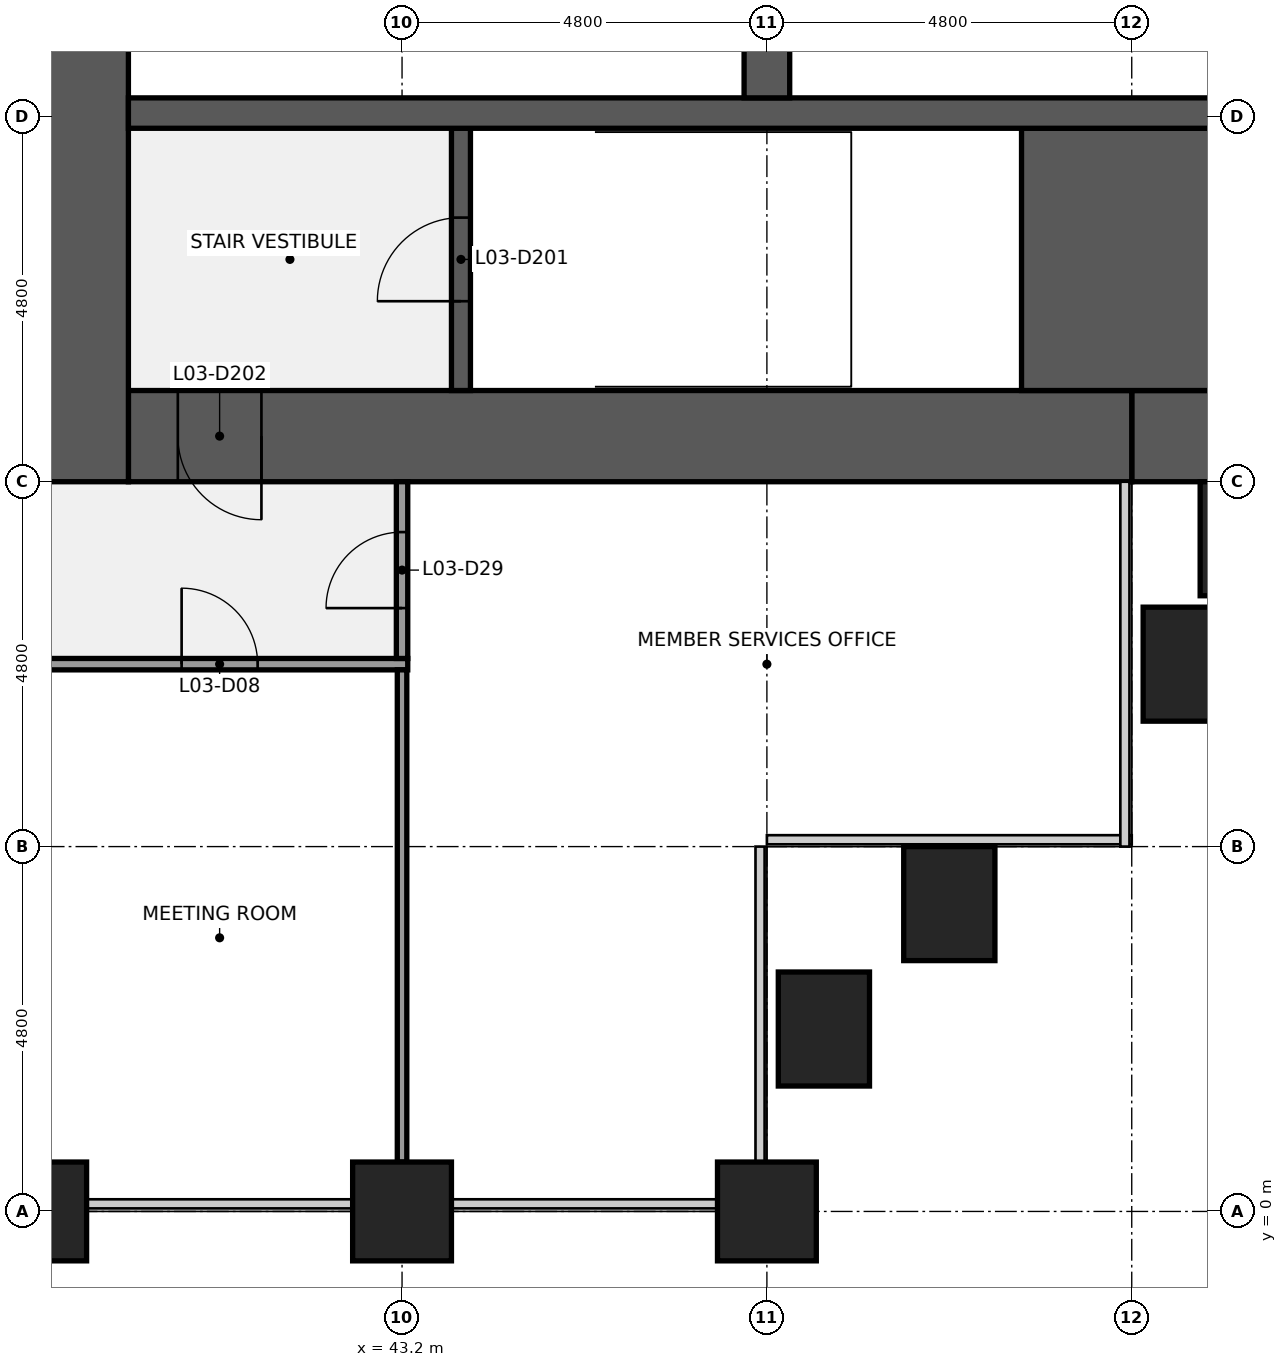
"""IFC4 building model, lengths in metres.
Left out: names, types, materials, properties, quantities, classifications, styles, units other than length and angle.
Written with IfcOpenShell. Run it as: python <this file> out.ifc"""

import sys

from ifc_helpers import new_model, si_unit, direction, frame, frame_2d, origin, origin_2d, place, context, subcontext, project, spatial, rectangle, extrude, element, fill, save


model = new_model("IFC4")
c1 = context("Model", 3, precision=1e-05, world=origin(), true_north=direction((0.0, 1.0)))
c2 = subcontext(c1, "Body", "Model", "MODEL_VIEW")
j1 = project(units=[si_unit("LENGTHUNIT", "METRE"), si_unit("PLANEANGLEUNIT", "RADIAN")], contexts=[c1])
p1 = place(None, origin())
s1 = spatial("IfcSite", under=j1, at=p1, CompositionType="ELEMENT")
p2 = place(p1, origin())
s2 = spatial("IfcBuilding", under=s1, at=p2, CompositionType="ELEMENT")
p3 = place(p2, frame((0.0, 0.0, 21.4)))
s3 = spatial("IfcBuildingStorey", under=s2, at=p3, CompositionType="ELEMENT", Elevation=21.4)
for number, where, z_axis, x_axis in (
    (1, (38.4, 0.0, 0.0), (0.0, 0.0, 1.0), (1.0, 0.0, 0.0)),
    (2, (43.2, 0.0, 0.0), (0.0, 0.0, 1.0), (1.0, 0.0, 0.0)),
    (3, (48.0, 0.0, 0.0), (0.0, 0.0, 1.0), (1.0, 0.0, 0.0)),
):
    element("IfcColumn", number, at=place(p3, frame(where, z_axis=z_axis, x_axis=x_axis)), inside=s3, PredefinedType="COLUMN", context=c2, shape_type="SweptSolid", body=[
        extrude(rectangle(XDim=1.3, YDim=1.3, at=origin_2d()), origin(), (0.0, 0.0, 1.0), 4.4),
    ])
p4 = place(p3, frame((56.4, 10.2, 0.0), z_axis=(0.0, 0.0, 1.0), x_axis=(-1.0, 0.0, 0.0)))
e4 = element("IfcWall", 4, at=p4, inside=s3, PredefinedType="SHEAR", context=c2, shape_type="SweptSolid", body=[
    extrude(rectangle(XDim=3.6, YDim=1.2, at=frame_2d((1.8, 0.0))), origin(), (0.0, 0.0, 1.0), 4.24),
])
p5 = place(p3, frame((52.8, 10.2, 0.0), z_axis=(0.0, 0.0, 1.0), x_axis=(-1.0, 0.0, 0.0)))
e5 = element("IfcWall", 5, at=p5, inside=s3, PredefinedType="SHEAR", context=c2, shape_type="SweptSolid", body=[
    extrude(rectangle(XDim=13.2, YDim=1.2, at=frame_2d((6.6, 0.0))), origin(), (0.0, 0.0, 1.0), 4.24),
])
p6 = place(p5, frame((11.45, 0.0, 0.0)))
e6 = element("IfcOpeningElement", 6, at=p6, cuts=e5, PredefinedType="OPENING", context=c2, shape_type="SweptSolid", body=[
    extrude(rectangle(XDim=1.1, YDim=2.1, at=frame_2d((0.55, 1.05))), frame((0.0, 0.61, 0.0), z_axis=(0.0, -1.0, 0.0), x_axis=(1.0, 0.0, 0.0)), (0.0, 0.0, 1.0), 1.22),
])
p7 = place(p3, frame((39.0, 9.6, 0.0), z_axis=(0.0, 0.0, 1.0), x_axis=(0.0, 1.0, 0.0)))
e7 = element("IfcWall", 7, at=p7, inside=s3, PredefinedType="SHEAR", context=c2, shape_type="SweptSolid", body=[
    extrude(rectangle(XDim=28.8, YDim=1.2, at=frame_2d((14.4, 0.0))), origin(), (0.0, 0.0, 1.0), 4.24),
])
p8 = place(p7, frame((8.7, 0.0, 0.0)))
e8 = element("IfcOpeningElement", 8, at=p8, cuts=e7, PredefinedType="OPENING", context=c2, shape_type="SweptSolid", body=[
    extrude(rectangle(XDim=1.8, YDim=2.1, at=frame_2d((0.9, 1.05))), frame((0.0, 0.61, 0.0), z_axis=(0.0, -1.0, 0.0), x_axis=(1.0, 0.0, 0.0)), (0.0, 0.0, 1.0), 1.22),
])
p9 = place(p7, frame((18.3, 0.0, 0.0)))
e9 = element("IfcOpeningElement", 9, at=p9, cuts=e7, PredefinedType="OPENING", context=c2, shape_type="SweptSolid", body=[
    extrude(rectangle(XDim=1.8, YDim=2.1, at=frame_2d((0.9, 1.05))), frame((0.0, 0.61, 0.0), z_axis=(0.0, -1.0, 0.0), x_axis=(1.0, 0.0, 0.0)), (0.0, 0.0, 1.0), 1.22),
])
p10 = place(p3, frame((51.35, 12.525, 0.0), z_axis=(0.0, 0.0, 1.0), x_axis=(1.0, 0.0, 0.0)))
e10 = element("IfcWall", 10, at=p10, inside=s3, PredefinedType="SHEAR", context=c2, shape_type="SweptSolid", body=[
    extrude(rectangle(XDim=5.05, YDim=3.45, at=frame_2d((2.525, 0.0))), origin(), (0.0, 0.0, 1.0), 4.24),
])
p11 = place(p3, frame((43.975, 10.8, 0.0), z_axis=(0.0, 0.0, 1.0), x_axis=(0.0, 1.0, 0.0)))
e11 = element("IfcWall", 11, at=p11, inside=s3, PredefinedType="SHEAR", context=c2, shape_type="SweptSolid", body=[
    extrude(rectangle(XDim=3.45, YDim=0.25, at=frame_2d((1.725, 0.0))), origin(), (0.0, 0.0, 1.0), 4.24),
])
p12 = place(p11, frame((1.175, 0.0, 0.0)))
e12 = element("IfcOpeningElement", 12, at=p12, cuts=e11, PredefinedType="OPENING", context=c2, shape_type="SweptSolid", body=[
    extrude(rectangle(XDim=1.1, YDim=2.1, at=frame_2d((0.55, 1.05))), frame((0.0, 0.135, 0.0), z_axis=(0.0, -1.0, 0.0), x_axis=(1.0, 0.0, 0.0)), (0.0, 0.0, 1.0), 0.27),
])
p13 = place(p3, frame((39.6, 14.45, 0.0), z_axis=(0.0, 0.0, 1.0), x_axis=(1.0, 0.0, 0.0)))
e13 = element("IfcWall", 13, at=p13, inside=s3, PredefinedType="SHEAR", context=c2, shape_type="SweptSolid", body=[
    extrude(rectangle(XDim=16.8, YDim=0.4, at=frame_2d((8.4, 0.0))), origin(), (0.0, 0.0, 1.0), 4.24),
])
p14 = place(p3, frame((48.0, 14.65, 0.0), z_axis=(0.0, 0.0, 1.0), x_axis=(0.0, 1.0, 0.0)))
e14 = element("IfcWall", 14, at=p14, inside=s3, PredefinedType="SHEAR", context=c2, shape_type="SweptSolid", body=[
    extrude(rectangle(XDim=2.6, YDim=0.6, at=frame_2d((1.3, 0.0))), origin(), (0.0, 0.0, 1.0), 4.24),
])
p15 = place(p3, frame((38.325, 7.2, 0.0), z_axis=(0.0, 0.0, 1.0), x_axis=(1.0, 0.0, 0.0)))
e15 = element("IfcWall", 15, at=p15, inside=s3, PredefinedType="PARTITIONING", context=c2, shape_type="SweptSolid", body=[
    extrude(rectangle(XDim=4.95, YDim=0.15, at=frame_2d((2.475, 0.0))), origin(), (0.0, 0.0, 1.0), 3.27),
])
p16 = place(p15, frame((1.975, 0.0, 0.0)))
e16 = element("IfcOpeningElement", 16, at=p16, cuts=e15, PredefinedType="OPENING", context=c2, shape_type="SweptSolid", body=[
    extrude(rectangle(XDim=1.0, YDim=2.1, at=frame_2d((0.5, 1.05))), frame((0.0, 0.085, 0.0), z_axis=(0.0, -1.0, 0.0), x_axis=(1.0, 0.0, 0.0)), (0.0, 0.0, 1.0), 0.17),
])
p17 = place(p3, frame((43.2, 0.65, 0.0), z_axis=(0.0, 0.0, 1.0), x_axis=(0.0, 1.0, 0.0)))
e17 = element("IfcWall", 17, at=p17, inside=s3, PredefinedType="PARTITIONING", context=c2, shape_type="SweptSolid", body=[
    extrude(rectangle(XDim=6.475, YDim=0.125, at=frame_2d((3.238, 0.0))), origin(), (0.0, 0.0, 1.0), 3.27),
])
p18 = place(p3, frame((43.2, 7.275, 0.0), z_axis=(0.0, 0.0, 1.0), x_axis=(0.0, 1.0, 0.0)))
e18 = element("IfcWall", 18, at=p18, inside=s3, PredefinedType="PARTITIONING", context=c2, shape_type="SweptSolid", body=[
    extrude(rectangle(XDim=2.325, YDim=0.15, at=frame_2d((1.163, 0.0))), origin(), (0.0, 0.0, 1.0), 3.27),
])
p19 = place(p18, frame((0.663, 0.0, 0.0)))
e19 = element("IfcOpeningElement", 19, at=p19, cuts=e18, PredefinedType="OPENING", context=c2, shape_type="SweptSolid", body=[
    extrude(rectangle(XDim=1.0, YDim=2.1, at=frame_2d((0.5, 1.05))), frame((0.0, 0.085, 0.0), z_axis=(0.0, -1.0, 0.0), x_axis=(1.0, 0.0, 0.0)), (0.0, 0.0, 1.0), 0.17),
])
for number, where, z_axis, x_axis in (
    (20, (48.75, 2.4, 0.0), (0.0, 0.0, 1.0), (0.0, 1.0, 0.0)),
    (21, (50.4, 4.05, 0.0), (0.0, 0.0, 1.0), (1.0, 0.0, 0.0)),
    (22, (53.55, 7.2, 0.0), (0.0, 0.0, 1.0), (0.0, 1.0, 0.0)),
):
    element("IfcColumn", number, at=place(p3, frame(where, z_axis=z_axis, x_axis=x_axis)), inside=s3, PredefinedType="PILASTER", context=c2, shape_type="SweptSolid", body=[
        extrude(rectangle(XDim=1.2, YDim=1.5, at=origin_2d()), origin(), (0.0, 0.0, 1.0), 4.4),
    ])
p20 = place(p3, frame((55.2, 8.85, 0.0), z_axis=(0.0, 0.0, 1.0), x_axis=(1.0, 0.0, 0.0)))
e23 = element("IfcColumn", 23, at=p20, inside=s3, PredefinedType="PILASTER", context=c2, shape_type="SweptSolid", body=[
    extrude(rectangle(XDim=3.0, YDim=1.5, at=origin_2d()), origin(), (0.0, 0.0, 1.0), 4.4),
])
for number, where, z_axis, x_axis in (
    (24, (38.4, -1.075, 0.0), (0.0, 0.0, 1.0), (1.0, 0.0, 0.0)),
    (25, (43.2, -1.075, 0.0), (0.0, 0.0, 1.0), (1.0, 0.0, 0.0)),
    (26, (48.0, -1.075, 0.0), (0.0, 0.0, 1.0), (1.0, 0.0, 0.0)),
):
    element("IfcColumn", number, at=place(p3, frame(where, z_axis=z_axis, x_axis=x_axis)), inside=s3, PredefinedType="PILASTER", context=c2, shape_type="SweptSolid", body=[
        extrude(rectangle(XDim=4.2, YDim=0.85, at=origin_2d()), origin(), (0.0, 0.0, 1.0), 4.4),
    ])
p21 = place(p12, origin())
e27 = element("IfcDoor", 27, at=p21, inside=s3, OperationType="SINGLE_SWING_LEFT", PredefinedType="DOOR", context=c2, shape_type="SweptSolid", body=[
    extrude(rectangle(XDim=1.1, YDim=2.1, at=frame_2d((0.55, 1.05))), frame((0.0, 0.025, 0.0), z_axis=(0.0, -1.0, 0.0), x_axis=(1.0, 0.0, 0.0)), (0.0, 0.0, 1.0), 0.05),
])
fill(e12, e27)
p22 = place(p6, origin())
e28 = element("IfcDoor", 28, at=p22, inside=s3, OperationType="SINGLE_SWING_LEFT", PredefinedType="DOOR", context=c2, shape_type="SweptSolid", body=[
    extrude(rectangle(XDim=1.1, YDim=2.1, at=frame_2d((0.55, 1.05))), frame((0.0, 0.025, 0.0), z_axis=(0.0, -1.0, 0.0), x_axis=(1.0, 0.0, 0.0)), (0.0, 0.0, 1.0), 0.05),
])
fill(e6, e28)
p23 = place(p16, origin())
e29 = element("IfcDoor", 29, at=p23, inside=s3, OperationType="SINGLE_SWING_LEFT", PredefinedType="DOOR", context=c2, shape_type="SweptSolid", body=[
    extrude(rectangle(XDim=1.0, YDim=2.1, at=frame_2d((0.5, 1.05))), frame((0.0, 0.025, 0.0), z_axis=(0.0, -1.0, 0.0), x_axis=(1.0, 0.0, 0.0)), (0.0, 0.0, 1.0), 0.05),
])
fill(e16, e29)
p24 = place(p19, origin())
e30 = element("IfcDoor", 30, at=p24, inside=s3, OperationType="SINGLE_SWING_LEFT", PredefinedType="DOOR", context=c2, shape_type="SweptSolid", body=[
    extrude(rectangle(XDim=1.0, YDim=2.1, at=frame_2d((0.5, 1.05))), frame((0.0, 0.025, 0.0), z_axis=(0.0, -1.0, 0.0), x_axis=(1.0, 0.0, 0.0)), (0.0, 0.0, 1.0), 0.05),
])
fill(e19, e30)
save(model, sys.argv[1])
